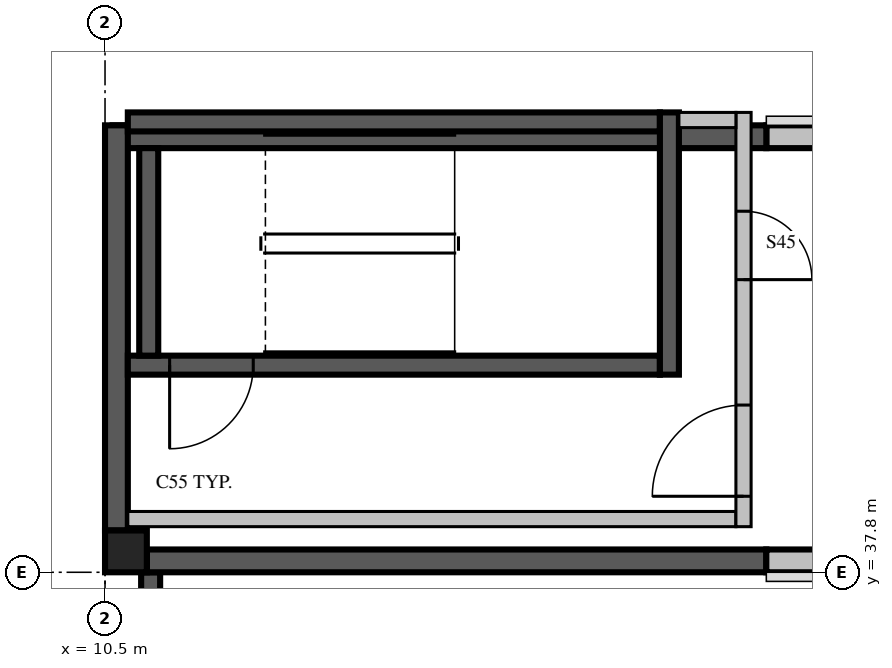
"""IFC4 building model, lengths in metres.
Left out: names, types, materials, properties, quantities, classifications, styles, units other than length and angle.
Written with IfcOpenShell. Run it as: python <this file> out.ifc"""

import sys

from ifc_helpers import new_model, si_unit, direction, frame, frame_2d, origin, origin_2d, place, context, subcontext, project, spatial, rectangle, extrude, source, transform, mapped, element, fill, save


model = new_model("IFC4")
c1 = context("Model", 3, precision=1e-05, world=origin(), true_north=direction((0.0, 1.0)))
c2 = subcontext(c1, "Body", "Model", "MODEL_VIEW")
j1 = project(units=[si_unit("LENGTHUNIT", "METRE"), si_unit("PLANEANGLEUNIT", "RADIAN")], contexts=[c1])
p1 = place(None, origin())
s1 = spatial("IfcSite", under=j1, at=p1, CompositionType="ELEMENT")
p2 = place(p1, origin())
s2 = spatial("IfcBuilding", under=s1, at=p2, CompositionType="ELEMENT")
p3 = place(p2, frame((0.0, 0.0, 376.5)))
s3 = spatial("IfcBuildingStorey", under=s2, at=p3, CompositionType="ELEMENT", Elevation=376.5)
m1 = source(origin(), c2, "Body", "SweptSolid", [
    extrude(rectangle(XDim=0.55, YDim=0.55, at=origin_2d()), origin(), (0.0, 0.0, 1.0), 4.0),
])
p4 = place(p3, frame((10.775, 38.075, 0.0), z_axis=(0.0, 0.0, 1.0), x_axis=(1.0, 0.0, 0.0)))
e1 = element("IfcColumn", 1, at=p4, inside=s3, PredefinedType="COLUMN", context=c2, shape_type="MappedRepresentation", body=[
    mapped(m1, transform((0.0, 0.0, 0.0), scale=1.0)),
])
m2 = source(origin(), c2, "Body", "SweptSolid", [
    extrude(rectangle(XDim=2.808, YDim=0.25, at=frame_2d((1.404, 0.0))), origin(), (0.0, 0.0, 1.0), 3.55),
])
p5 = place(p3, frame((11.1, 37.8, 0.0), z_axis=(0.0, 0.0, 1.0), x_axis=(0.0, -1.0, 0.0)))
e2 = element("IfcWall", 2, at=p5, inside=s3, PredefinedType="SOLIDWALL", context=c2, shape_type="MappedRepresentation", body=[
    mapped(m2, transform((0.0, 0.0, 0.0), scale=1.0)),
])
p6 = place(p3, frame((11.05, 37.95, 0.0), z_axis=(0.0, 0.0, 1.0), x_axis=(1.0, 0.0, 0.0)))
e3 = element("IfcWall", 3, at=p6, inside=s3, PredefinedType="SOLIDWALL", context=c2, shape_type="SweptSolid", body=[
    extrude(rectangle(XDim=8.15, YDim=0.3, at=frame_2d((4.075, 0.0))), origin(), (0.0, 0.0, 1.0), 3.55),
])
p7 = place(p3, frame((19.2, 37.95, 0.0), z_axis=(0.0, 0.0, 1.0), x_axis=(1.0, 0.0, 0.0)))
e4 = element("IfcWall", 4, at=p7, inside=s3, PredefinedType="STANDARD", context=c2, shape_type="SweptSolid", body=[
    extrude(rectangle(XDim=1.25, YDim=0.3, at=frame_2d((0.625, 0.0))), origin(), (0.0, 0.0, 1.0), 3.55),
])
m3 = source(origin(), c2, "Body", "SweptSolid", [
    extrude(rectangle(XDim=1.8, YDim=0.3, at=frame_2d((0.9, 0.0))), origin(), (0.0, 0.0, 1.0), 3.55),
])
p8 = place(p3, frame((21.0, 43.53, 0.0), z_axis=(0.0, 0.0, 1.0), x_axis=(-1.0, 0.0, 0.0)))
e5 = element("IfcWall", 5, at=p8, inside=s3, PredefinedType="STANDARD", context=c2, shape_type="MappedRepresentation", body=[
    mapped(m3, transform((0.0, 0.0, 0.0), scale=1.0)),
])
m4 = source(origin(), c2, "Body", "SweptSolid", [
    extrude(rectangle(XDim=8.6, YDim=0.3, at=frame_2d((4.3, 0.0))), origin(), (0.0, 0.0, 1.0), 3.55),
])
p9 = place(p3, frame((19.2, 43.53, 0.0), z_axis=(0.0, 0.0, 1.0), x_axis=(-1.0, 0.0, 0.0)))
e6 = element("IfcWall", 6, at=p9, inside=s3, PredefinedType="SOLIDWALL", context=c2, shape_type="MappedRepresentation", body=[
    mapped(m4, transform((0.0, 0.0, 0.0), scale=1.0)),
])
p10 = place(p3, frame((10.65, 43.68, 0.0), z_axis=(0.0, 0.0, 1.0), x_axis=(0.0, -1.0, 0.0)))
e7 = element("IfcWall", 7, at=p10, inside=s3, PredefinedType="SOLIDWALL", context=c2, shape_type="SweptSolid", body=[
    extrude(rectangle(XDim=5.33, YDim=0.3, at=frame_2d((2.665, 0.0))), origin(), (0.0, 0.0, 1.0), 3.55),
])
m5 = source(origin(), c2, "Body", "SweptSolid", [
    extrude(rectangle(XDim=7.0, YDim=0.25, at=frame_2d((3.5, 0.0))), origin(), (0.0, 0.0, 1.0), 3.55),
])
p11 = place(p3, frame((10.8, 40.525, 0.0), z_axis=(0.0, 0.0, 1.0), x_axis=(1.0, 0.0, 0.0)))
e8 = element("IfcWall", 8, at=p11, inside=s3, PredefinedType="SOLIDWALL", context=c2, shape_type="MappedRepresentation", body=[
    mapped(m5, transform((0.0, 0.0, 0.0), scale=1.0)),
])
m6 = source(origin(), c2, "Body", "SweptSolid", [
    extrude(rectangle(XDim=1.1, YDim=2.1, at=frame_2d((0.55, 1.05))), frame((0.0, 0.135, 0.0), z_axis=(0.0, -1.0, 0.0), x_axis=(1.0, 0.0, 0.0)), (0.0, 0.0, 1.0), 0.27),
])
p12 = place(p11, frame((0.55, 0.0, 0.0)))
e9 = element("IfcOpeningElement", 9, at=p12, cuts=e8, PredefinedType="OPENING", context=c2, shape_type="MappedRepresentation", body=[
    mapped(m6, transform((0.0, 0.0, 0.0), scale=1.0)),
])
p13 = place(p3, frame((10.8, 43.725, 0.0), z_axis=(0.0, 0.0, 1.0), x_axis=(1.0, 0.0, 0.0)))
e10 = element("IfcWall", 10, at=p13, inside=s3, PredefinedType="SOLIDWALL", context=c2, shape_type="MappedRepresentation", body=[
    mapped(m5, transform((0.0, 0.0, 0.0), scale=1.0)),
])
m7 = source(origin(), c2, "Body", "SweptSolid", [
    extrude(rectangle(XDim=3.45, YDim=0.25, at=frame_2d((1.725, 0.0))), origin(), (0.0, 0.0, 1.0), 3.55),
])
p14 = place(p3, frame((17.925, 40.4, 0.0), z_axis=(0.0, 0.0, 1.0), x_axis=(0.0, 1.0, 0.0)))
e11 = element("IfcWall", 11, at=p14, inside=s3, PredefinedType="SOLIDWALL", context=c2, shape_type="MappedRepresentation", body=[
    mapped(m7, transform((0.0, 0.0, 0.0), scale=1.0)),
])
m8 = source(origin(), c2, "Body", "SweptSolid", [
    extrude(rectangle(XDim=2.73, YDim=0.25, at=frame_2d((1.365, 0.0))), origin(), (0.0, 0.0, 1.0), 3.55),
])
p15 = place(p3, frame((11.075, 40.65, 0.0), z_axis=(0.0, 0.0, 1.0), x_axis=(0.0, 1.0, 0.0)))
e12 = element("IfcWall", 12, at=p15, inside=s3, PredefinedType="SOLIDWALL", context=c2, shape_type="MappedRepresentation", body=[
    mapped(m8, transform((0.0, 0.0, 0.0), scale=1.0)),
])
m9 = source(origin(), c2, "Body", "SweptSolid", [
    extrude(rectangle(XDim=8.0, YDim=0.2, at=frame_2d((4.0, 0.0))), origin(), (0.0, 0.0, 1.0), 3.55),
])
p16 = place(p3, frame((10.8, 38.5, 0.0), z_axis=(0.0, 0.0, 1.0), x_axis=(1.0, 0.0, 0.0)))
e13 = element("IfcWall", 13, at=p16, inside=s3, PredefinedType="PARTITIONING", context=c2, shape_type="MappedRepresentation", body=[
    mapped(m9, transform((0.0, 0.0, 0.0), scale=1.0)),
])
m10 = source(origin(), c2, "Body", "SweptSolid", [
    extrude(rectangle(XDim=5.45, YDim=0.2, at=frame_2d((2.725, 0.0))), origin(), (0.0, 0.0, 1.0), 3.55),
])
p17 = place(p3, frame((18.9, 38.4, 0.0), z_axis=(0.0, 0.0, 1.0), x_axis=(0.0, 1.0, 0.0)))
e14 = element("IfcWall", 14, at=p17, inside=s3, PredefinedType="PARTITIONING", context=c2, shape_type="MappedRepresentation", body=[
    mapped(m10, transform((0.0, 0.0, 0.0), scale=1.0)),
])
m11 = source(origin(), c2, "Body", "SweptSolid", [
    extrude(rectangle(XDim=1.2, YDim=2.1, at=frame_2d((0.6, 1.05))), frame((0.0, 0.11, 0.0), z_axis=(0.0, -1.0, 0.0), x_axis=(1.0, 0.0, 0.0)), (0.0, 0.0, 1.0), 0.22),
])
p18 = place(p17, frame((0.4, 0.0, 0.0)))
e15 = element("IfcOpeningElement", 15, at=p18, cuts=e14, PredefinedType="OPENING", context=c2, shape_type="MappedRepresentation", body=[
    mapped(m11, transform((0.0, 0.0, 0.0), scale=1.0)),
])
m12 = source(origin(), c2, "Body", "SweptSolid", [
    extrude(rectangle(XDim=0.9, YDim=2.1, at=frame_2d((0.45, 1.05))), frame((0.0, 0.11, 0.0), z_axis=(0.0, -1.0, 0.0), x_axis=(1.0, 0.0, 0.0)), (0.0, 0.0, 1.0), 0.22),
])
p19 = place(p17, frame((3.25, 0.0, 0.0)))
e16 = element("IfcOpeningElement", 16, at=p19, cuts=e14, PredefinedType="OPENING", context=c2, shape_type="MappedRepresentation", body=[
    mapped(m12, transform((0.0, 0.0, 0.0), scale=1.0)),
])
m13 = source(origin(), c2, "Body", "SweptSolid", [
    extrude(rectangle(XDim=0.75, YDim=0.2, at=frame_2d((0.375, 0.0))), origin(), (0.0, 0.0, 1.0), 3.55),
])
p20 = place(p3, frame((18.05, 43.75, 0.0), z_axis=(0.0, 0.0, 1.0), x_axis=(1.0, 0.0, 0.0)))
e17 = element("IfcWall", 17, at=p20, inside=s3, PredefinedType="PARTITIONING", context=c2, shape_type="MappedRepresentation", body=[
    mapped(m13, transform((0.0, 0.0, 0.0), scale=1.0)),
])
m14 = source(origin(), c2, "Body", "SweptSolid", [
    extrude(rectangle(XDim=1.1, YDim=2.1, at=frame_2d((0.55, 1.05))), frame((0.0, 0.025, 0.0), z_axis=(0.0, -1.0, 0.0), x_axis=(1.0, 0.0, 0.0)), (0.0, 0.0, 1.0), 0.05),
])
p21 = place(p12, origin())
e18 = element("IfcDoor", 18, at=p21, inside=s3, OperationType="SINGLE_SWING_RIGHT", PredefinedType="DOOR", context=c2, shape_type="MappedRepresentation", body=[
    mapped(m14, transform((0.0, 0.0, 0.0), scale=1.0)),
])
fill(e9, e18)
m15 = source(origin(), c2, "Body", "SweptSolid", [
    extrude(rectangle(XDim=1.2, YDim=2.1, at=frame_2d((0.6, 1.05))), frame((0.0, 0.025, 0.0), z_axis=(0.0, -1.0, 0.0), x_axis=(1.0, 0.0, 0.0)), (0.0, 0.0, 1.0), 0.05),
])
p22 = place(p18, origin())
e19 = element("IfcDoor", 19, at=p22, inside=s3, OperationType="SINGLE_SWING_LEFT", PredefinedType="DOOR", context=c2, shape_type="MappedRepresentation", body=[
    mapped(m15, transform((0.0, 0.0, 0.0), scale=1.0)),
])
fill(e15, e19)
m16 = source(origin(), c2, "Body", "SweptSolid", [
    extrude(rectangle(XDim=0.9, YDim=2.1, at=frame_2d((0.45, 1.05))), frame((0.0, 0.025, 0.0), z_axis=(0.0, -1.0, 0.0), x_axis=(1.0, 0.0, 0.0)), (0.0, 0.0, 1.0), 0.05),
])
p23 = place(p19, origin())
e20 = element("IfcDoor", 20, at=p23, inside=s3, OperationType="SINGLE_SWING_RIGHT", PredefinedType="DOOR", context=c2, shape_type="MappedRepresentation", body=[
    mapped(m16, transform((0.0, 0.0, 0.0), scale=1.0)),
])
fill(e16, e20)
save(model, sys.argv[1])
